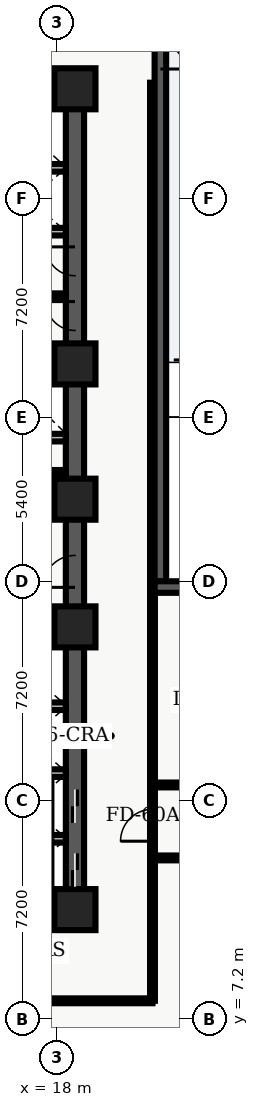
"""IFC4 building model, lengths in metres.
Left out: names, types, materials, properties, quantities, classifications, styles, units other than length and angle.
Written with IfcOpenShell. Run it as: python <this file> out.ifc"""

import sys

from ifc_helpers import new_model, entity, si_unit, converted_unit, direction, frame, origin_with_axes, origin_2d_with_axis, place, context, subcontext, project, spatial, polyline, rectangle, outline, extrude, element, fill, save


model = new_model("IFC4")
c1 = context("Model", 3, precision=1e-05, world=origin_with_axes(), true_north=direction((0.0, 1.0)))
c2 = subcontext(c1, "Body", "Model", "MODEL_VIEW")
j1 = project(units=[si_unit("LENGTHUNIT", "METRE"), converted_unit("PLANEANGLEUNIT", "DEGREE", entity("IfcPlaneAngleMeasure", 0.017), si_unit("PLANEANGLEUNIT", "RADIAN"), dimensions=[0, 0, 0, 0, 0, 0, 0])], contexts=[c1])
p1 = place(None, origin_with_axes())
s1 = spatial("IfcSite", under=j1, at=p1, CompositionType="ELEMENT")
p2 = place(p1, origin_with_axes())
s2 = spatial("IfcBuilding", under=s1, at=p2, CompositionType="ELEMENT")
p3 = place(p2, frame((0.0, 0.0, 28.8), z_axis=(0.0, 0.0, 1.0), x_axis=(1.0, 0.0, 0.0)))
s3 = spatial("IfcBuildingStorey", under=s2, at=p3, CompositionType="ELEMENT", Elevation=28.8)
p4 = place(p3, frame((11.4, 10.8, 0.0), z_axis=(0.0, 0.0, 1.0), x_axis=(1.0, 0.0, 0.0)))
e1 = element("IfcWall", 1, at=p4, inside=s3, PredefinedType="SHEAR", context=c2, shape_type="SweptSolid", body=[
    extrude(outline(polyline([(0.0, -0.3), (7.2, -0.3), (7.2, 0.3), (0.0, 0.3), (0.0, -0.3)])), origin_with_axes(), (0.0, 0.0, 1.0), 3.66),
])
p5 = place(p4, frame((2.625, 0.0, 0.0), z_axis=(0.0, 0.0, 1.0), x_axis=(1.0, 0.0, 0.0)))
e2 = element("IfcOpeningElement", 2, at=p5, cuts=e1, PredefinedType="OPENING", context=c2, shape_type="SweptSolid", body=[
    extrude(rectangle(XDim=1.05, YDim=0.62, at=origin_2d_with_axis()), origin_with_axes(), (0.0, 0.0, 1.0), 2.15),
])
p6 = place(p3, frame((11.4, 37.8, 0.0), z_axis=(0.0, 0.0, 1.0), x_axis=(1.0, 0.0, 0.0)))
e3 = element("IfcWall", 3, at=p6, inside=s3, PredefinedType="SHEAR", context=c2, shape_type="SweptSolid", body=[
    extrude(outline(polyline([(0.0, -0.3), (7.2, -0.3), (7.2, 0.3), (0.0, 0.3), (0.0, -0.3)])), origin_with_axes(), (0.0, 0.0, 1.0), 3.66),
])
p7 = place(p6, frame((2.625, 0.0, 0.0), z_axis=(0.0, 0.0, 1.0), x_axis=(1.0, 0.0, 0.0)))
e4 = element("IfcOpeningElement", 4, at=p7, cuts=e3, PredefinedType="OPENING", context=c2, shape_type="SweptSolid", body=[
    extrude(rectangle(XDim=1.05, YDim=0.62, at=origin_2d_with_axis()), origin_with_axes(), (0.0, 0.0, 1.0), 2.15),
])
p8 = place(p3, frame((18.6, 10.8, 0.0), z_axis=(0.0, 0.0, 1.0), x_axis=(0.0, 1.0, 0.0)))
e5 = element("IfcWall", 5, at=p8, inside=s3, PredefinedType="SHEAR", context=c2, shape_type="SweptSolid", body=[
    extrude(outline(polyline([(0.0, -0.3), (13.5, -0.3), (13.5, 0.3), (0.0, 0.3), (0.0, -0.3)])), origin_with_axes(), (0.0, 0.0, 1.0), 3.66),
])
p9 = place(p8, frame((1.3, 0.0, 0.0), z_axis=(0.0, 0.0, 1.0), x_axis=(1.0, 0.0, 0.0)))
e6 = element("IfcOpeningElement", 6, at=p9, cuts=e5, PredefinedType="OPENING", context=c2, shape_type="SweptSolid", body=[
    extrude(rectangle(XDim=1.1, YDim=0.62, at=origin_2d_with_axis()), origin_with_axes(), (0.0, 0.0, 1.0), 2.15),
])
p10 = place(p8, frame((3.4, 0.0, 0.0), z_axis=(0.0, 0.0, 1.0), x_axis=(1.0, 0.0, 0.0)))
e7 = element("IfcOpeningElement", 7, at=p10, cuts=e5, PredefinedType="OPENING", context=c2, shape_type="SweptSolid", body=[
    extrude(rectangle(XDim=1.1, YDim=0.62, at=origin_2d_with_axis()), origin_with_axes(), (0.0, 0.0, 1.0), 2.15),
])
p11 = place(p8, frame((11.125, 0.0, 0.0), z_axis=(0.0, 0.0, 1.0), x_axis=(1.0, 0.0, 0.0)))
e8 = element("IfcOpeningElement", 8, at=p11, cuts=e5, PredefinedType="OPENING", context=c2, shape_type="SweptSolid", body=[
    extrude(rectangle(XDim=1.05, YDim=0.62, at=origin_2d_with_axis()), origin_with_axes(), (0.0, 0.0, 1.0), 2.15),
])
p12 = place(p3, frame((18.6, 24.3, 0.0), z_axis=(0.0, 0.0, 1.0), x_axis=(0.0, 1.0, 0.0)))
e9 = element("IfcWall", 9, at=p12, inside=s3, PredefinedType="SHEAR", context=c2, shape_type="SweptSolid", body=[
    extrude(outline(polyline([(0.0, -0.3), (13.5, -0.3), (13.5, 0.3), (0.0, 0.3), (0.0, -0.3)])), origin_with_axes(), (0.0, 0.0, 1.0), 3.66),
])
p13 = place(p12, frame((6.025, 0.0, 0.0), z_axis=(0.0, 0.0, 1.0), x_axis=(1.0, 0.0, 0.0)))
e10 = element("IfcOpeningElement", 10, at=p13, cuts=e9, PredefinedType="OPENING", context=c2, shape_type="SweptSolid", body=[
    extrude(rectangle(XDim=0.95, YDim=0.62, at=origin_2d_with_axis()), origin_with_axes(), (0.0, 0.0, 1.0), 2.15),
])
p14 = place(p12, frame((7.825, 0.0, 0.0), z_axis=(0.0, 0.0, 1.0), x_axis=(1.0, 0.0, 0.0)))
e11 = element("IfcOpeningElement", 11, at=p14, cuts=e9, PredefinedType="OPENING", context=c2, shape_type="SweptSolid", body=[
    extrude(rectangle(XDim=0.95, YDim=0.62, at=origin_2d_with_axis()), origin_with_axes(), (0.0, 0.0, 1.0), 2.15),
])
for number, where, z_axis, x_axis in (
    (12, (11.7, 19.825, 0.0), (0.0, 0.0, 1.0), (1.0, 0.0, 0.0)),
    (13, (11.7, 28.775, 0.0), (0.0, 0.0, 1.0), (1.0, 0.0, 0.0)),
):
    element("IfcWall", number, at=place(p3, frame(where, z_axis=z_axis, x_axis=x_axis)), inside=s3, PredefinedType="SHEAR", context=c2, shape_type="SweptSolid", body=[
        extrude(outline(polyline([(0.0, -0.125), (6.6, -0.125), (6.6, 0.125), (0.0, 0.125), (0.0, -0.125)])), origin_with_axes(), (0.0, 0.0, 1.0), 3.66),
    ])
p15 = place(p3, frame((11.7, 24.1, 0.0), z_axis=(0.0, 0.0, 1.0), x_axis=(1.0, 0.0, 0.0)))
e14 = element("IfcWall", 14, at=p15, inside=s3, PredefinedType="SOLIDWALL", context=c2, shape_type="SweptSolid", body=[
    extrude(outline(polyline([(0.0, -0.125), (6.6, -0.125), (6.6, 0.125), (0.0, 0.125), (0.0, -0.125)])), origin_with_axes(), (0.0, 0.0, 1.0), 2.7),
])
p16 = place(p15, frame((3.75, 0.0, 0.0), z_axis=(0.0, 0.0, 1.0), x_axis=(1.0, 0.0, 0.0)))
e15 = element("IfcOpeningElement", 15, at=p16, cuts=e14, PredefinedType="OPENING", context=c2, shape_type="SweptSolid", body=[
    extrude(rectangle(XDim=0.9, YDim=0.27, at=origin_2d_with_axis()), origin_with_axes(), (0.0, 0.0, 1.0), 2.15),
])
p17 = place(p3, frame((11.7, 26.325, 0.0), z_axis=(0.0, 0.0, 1.0), x_axis=(1.0, 0.0, 0.0)))
e16 = element("IfcWall", 16, at=p17, inside=s3, PredefinedType="SOLIDWALL", context=c2, shape_type="SweptSolid", body=[
    extrude(outline(polyline([(0.0, -0.125), (6.6, -0.125), (6.6, 0.125), (0.0, 0.125), (0.0, -0.125)])), origin_with_axes(), (0.0, 0.0, 1.0), 2.7),
])
p18 = place(p17, frame((3.5, 0.0, 0.0), z_axis=(0.0, 0.0, 1.0), x_axis=(1.0, 0.0, 0.0)))
e17 = element("IfcOpeningElement", 17, at=p18, cuts=e16, PredefinedType="OPENING", context=c2, shape_type="SweptSolid", body=[
    extrude(rectangle(XDim=0.9, YDim=0.27, at=origin_2d_with_axis()), origin_with_axes(), (0.0, 0.0, 1.0), 2.15),
])
for number, where, z_axis, x_axis in (
    (18, (18.6, 10.8, 0.0), (0.0, 0.0, 1.0), (1.0, 0.0, 0.0)),
    (19, (18.6, 20.1, 0.0), (0.0, 0.0, 1.0), (1.0, 0.0, 0.0)),
    (20, (18.6, 24.3, 0.0), (0.0, 0.0, 1.0), (1.0, 0.0, 0.0)),
    (21, (18.6, 28.75, 0.0), (0.0, 0.0, 1.0), (1.0, 0.0, 0.0)),
    (22, (18.6, 37.8, 0.0), (0.0, 0.0, 1.0), (1.0, 0.0, 0.0)),
):
    element("IfcColumn", number, at=place(p3, frame(where, z_axis=z_axis, x_axis=x_axis)), inside=s3, PredefinedType="COLUMN", context=c2, shape_type="SweptSolid", body=[
        extrude(rectangle(XDim=1.35, YDim=1.35, at=origin_2d_with_axis()), origin_with_axes(), (0.0, 0.0, 1.0), 3.9),
    ])
p19 = place(p3, frame((14.62, 25.18, 0.0), z_axis=(0.0, 0.0, 1.0), x_axis=(1.0, 0.0, 0.0)))
e23 = element("IfcWall", 23, at=p19, inside=s3, PredefinedType="PARTITIONING", context=c2, shape_type="SweptSolid", body=[
    extrude(outline(polyline([(0.0, -0.08), (3.68, -0.08), (3.68, 0.08), (0.0, 0.08), (0.0, -0.08)])), origin_with_axes(), (0.0, 0.0, 1.0), 2.7),
])
p20 = place(p19, frame((1.95, 0.0, 0.0), z_axis=(0.0, 0.0, 1.0), x_axis=(1.0, 0.0, 0.0)))
e24 = element("IfcOpeningElement", 24, at=p20, cuts=e23, PredefinedType="OPENING", context=c2, shape_type="SweptSolid", body=[
    extrude(rectangle(XDim=0.9, YDim=0.18, at=origin_2d_with_axis()), origin_with_axes(), (0.0, 0.0, 1.0), 2.15),
])
for number, where, z_axis, x_axis in (
    (25, (15.84, 13.13, 0.0), (0.0, 0.0, 1.0), (1.0, 0.0, 0.0)),
    (26, (15.84, 15.29, 0.0), (0.0, 0.0, 1.0), (1.0, 0.0, 0.0)),
    (27, (15.84, 17.49, 0.0), (0.0, 0.0, 1.0), (1.0, 0.0, 0.0)),
    (28, (15.84, 33.1, 0.0), (0.0, 0.0, 1.0), (1.0, 0.0, 0.0)),
    (29, (15.84, 35.2, 0.0), (0.0, 0.0, 1.0), (1.0, 0.0, 0.0)),
):
    element("IfcWall", number, at=place(p3, frame(where, z_axis=z_axis, x_axis=x_axis)), inside=s3, PredefinedType="SOLIDWALL", context=c2, shape_type="SweptSolid", body=[
        extrude(outline(polyline([(0.0, -0.125), (2.46, -0.125), (2.46, 0.125), (0.0, 0.125), (0.0, -0.125)])), origin_with_axes(), (0.0, 0.0, 1.0), 2.7),
    ])
p21 = place(p3, frame((15.84, 31.0, 0.0), z_axis=(0.0, 0.0, 1.0), x_axis=(1.0, 0.0, 0.0)))
e30 = element("IfcWall", 30, at=p21, inside=s3, PredefinedType="PARTITIONING", context=c2, shape_type="SweptSolid", body=[
    extrude(outline(polyline([(0.0, -0.07), (2.46, -0.07), (2.46, 0.07), (0.0, 0.07), (0.0, -0.07)])), origin_with_axes(), (0.0, 0.0, 1.0), 2.7),
])
p22 = place(p3, frame((2.6, 7.8, 0.0), z_axis=(0.0, 0.0, 1.0), x_axis=(1.0, 0.0, 0.0)))
e31 = element("IfcWall", 31, at=p22, inside=s3, PredefinedType="PARTITIONING", context=c2, shape_type="SweptSolid", body=[
    extrude(outline(polyline([(0.0, -0.08), (18.55, -0.08), (18.55, 0.08), (0.0, 0.08), (0.0, -0.08)])), origin_with_axes(), (0.0, 0.0, 1.0), 2.7),
])
p23 = place(p22, frame((3.765, 0.0, 0.0), z_axis=(0.0, 0.0, 1.0), x_axis=(1.0, 0.0, 0.0)))
e32 = element("IfcOpeningElement", 32, at=p23, cuts=e31, PredefinedType="OPENING", context=c2, shape_type="SweptSolid", body=[
    extrude(rectangle(XDim=1.0, YDim=0.18, at=origin_2d_with_axis()), origin_with_axes(), (0.0, 0.0, 1.0), 2.15),
])
p24 = place(p22, frame((13.3, 0.0, 0.0), z_axis=(0.0, 0.0, 1.0), x_axis=(1.0, 0.0, 0.0)))
e33 = element("IfcOpeningElement", 33, at=p24, cuts=e31, PredefinedType="OPENING", context=c2, shape_type="SweptSolid", body=[
    extrude(rectangle(XDim=1.0, YDim=0.18, at=origin_2d_with_axis()), origin_with_axes(), (0.0, 0.0, 1.0), 2.15),
])
p25 = place(p3, frame((21.15, 7.8, 0.0), z_axis=(0.0, 0.0, 1.0), x_axis=(0.0, 1.0, 0.0)))
e34 = element("IfcWall", 34, at=p25, inside=s3, PredefinedType="PARTITIONING", context=c2, shape_type="SweptSolid", body=[
    extrude(outline(polyline([(0.0, -0.08), (30.2, -0.08), (30.2, 0.08), (0.0, 0.08), (0.0, -0.08)])), origin_with_axes(), (0.0, 0.0, 1.0), 2.7),
])
p26 = place(p25, frame((5.775, 0.0, 0.0), z_axis=(0.0, 0.0, 1.0), x_axis=(1.0, 0.0, 0.0)))
e35 = element("IfcOpeningElement", 35, at=p26, cuts=e34, PredefinedType="OPENING", context=c2, shape_type="SweptSolid", body=[
    extrude(rectangle(XDim=1.05, YDim=0.18, at=origin_2d_with_axis()), origin_with_axes(), (0.0, 0.0, 1.0), 2.15),
])
p27 = place(p3, frame((21.15, 12.5, 0.0), z_axis=(0.0, 0.0, 1.0), x_axis=(1.0, 0.0, 0.0)))
e36 = element("IfcWall", 36, at=p27, inside=s3, PredefinedType="PARTITIONING", context=c2, shape_type="SweptSolid", body=[
    extrude(outline(polyline([(0.0, -0.08), (15.2, -0.08), (15.2, 0.08), (0.0, 0.08), (0.0, -0.08)])), origin_with_axes(), (0.0, 0.0, 1.0), 2.7),
])
p28 = place(p27, frame((3.508, 0.0, 0.0), z_axis=(0.0, 0.0, 1.0), x_axis=(1.0, 0.0, 0.0)))
e37 = element("IfcOpeningElement", 37, at=p28, cuts=e36, PredefinedType="OPENING", context=c2, shape_type="SweptSolid", body=[
    extrude(rectangle(XDim=1.0, YDim=0.18, at=origin_2d_with_axis()), origin_with_axes(), (0.0, 0.0, 1.0), 2.15),
])
p29 = place(p27, frame((10.978, 0.0, 0.0), z_axis=(0.0, 0.0, 1.0), x_axis=(1.0, 0.0, 0.0)))
e38 = element("IfcOpeningElement", 38, at=p29, cuts=e36, PredefinedType="OPENING", context=c2, shape_type="SweptSolid", body=[
    extrude(rectangle(XDim=1.2, YDim=0.18, at=origin_2d_with_axis()), origin_with_axes(), (0.0, 0.0, 1.0), 2.2),
])
p30 = place(p3, frame((21.15, 14.9, 0.0), z_axis=(0.0, 0.0, 1.0), x_axis=(1.0, 0.0, 0.0)))
e39 = element("IfcWall", 39, at=p30, inside=s3, PredefinedType="PARTITIONING", context=c2, shape_type="SweptSolid", body=[
    extrude(outline(polyline([(0.0, -0.08), (15.2, -0.08), (15.2, 0.08), (0.0, 0.08), (0.0, -0.08)])), origin_with_axes(), (0.0, 0.0, 1.0), 2.7),
])
p31 = place(p30, frame((3.49, 0.0, 0.0), z_axis=(0.0, 0.0, 1.0), x_axis=(1.0, 0.0, 0.0)))
e40 = element("IfcOpeningElement", 40, at=p31, cuts=e39, PredefinedType="OPENING", context=c2, shape_type="SweptSolid", body=[
    extrude(rectangle(XDim=1.0, YDim=0.18, at=origin_2d_with_axis()), origin_with_axes(), (0.0, 0.0, 1.0), 2.15),
])
p32 = place(p30, frame((10.96, 0.0, 0.0), z_axis=(0.0, 0.0, 1.0), x_axis=(1.0, 0.0, 0.0)))
e41 = element("IfcOpeningElement", 41, at=p32, cuts=e39, PredefinedType="OPENING", context=c2, shape_type="SweptSolid", body=[
    extrude(rectangle(XDim=1.0, YDim=0.18, at=origin_2d_with_axis()), origin_with_axes(), (0.0, 0.0, 1.0), 2.15),
])
p33 = place(p3, frame((21.41, 45.82, 0.0), z_axis=(0.0, 0.0, 1.0), x_axis=(0.0, -1.0, 0.0)))
e42 = element("IfcWall", 42, at=p33, inside=s3, PredefinedType="SOLIDWALL", context=c2, shape_type="SweptSolid", body=[
    extrude(outline(polyline([(0.0, -0.19), (24.22, -0.19), (24.22, 0.19), (0.0, 0.19), (0.0, -0.19)])), origin_with_axes(), (0.0, 0.0, 1.0), 3.66),
])
p34 = place(p33, frame((6.57, 0.0, 0.0), z_axis=(0.0, 0.0, 1.0), x_axis=(1.0, 0.0, 0.0)))
e43 = element("IfcOpeningElement", 43, at=p34, cuts=e42, PredefinedType="OPENING", context=c2, shape_type="SweptSolid", body=[
    extrude(rectangle(XDim=1.6, YDim=0.4, at=origin_2d_with_axis()), origin_with_axes(), (0.0, 0.0, 1.0), 2.2),
])
p35 = place(p33, frame((2.902, 0.0, 0.45), z_axis=(0.0, 0.0, 1.0), x_axis=(1.0, 0.0, 0.0)))
e44 = element("IfcOpeningElement", 44, at=p35, cuts=e42, PredefinedType="OPENING", context=c2, shape_type="SweptSolid", body=[
    extrude(rectangle(XDim=2.1, YDim=0.4, at=origin_2d_with_axis()), origin_with_axes(), (0.0, 0.0, 1.0), 2.2),
])
p36 = place(p3, frame((21.22, 21.41, 0.0), z_axis=(0.0, 0.0, 1.0), x_axis=(1.0, 0.0, 0.0)))
e45 = element("IfcWall", 45, at=p36, inside=s3, PredefinedType="SOLIDWALL", context=c2, shape_type="SweptSolid", body=[
    extrude(outline(polyline([(0.0, -0.19), (17.18, -0.19), (17.18, 0.19), (0.0, 0.19), (0.0, -0.19)])), origin_with_axes(), (0.0, 0.0, 1.0), 3.66),
])
p37 = place(p36, frame((3.263, 0.0, 0.45), z_axis=(0.0, 0.0, 1.0), x_axis=(1.0, 0.0, 0.0)))
e46 = element("IfcOpeningElement", 46, at=p37, cuts=e45, PredefinedType="OPENING", context=c2, shape_type="SweptSolid", body=[
    extrude(rectangle(XDim=2.1, YDim=0.4, at=origin_2d_with_axis()), origin_with_axes(), (0.0, 0.0, 1.0), 2.2),
])
p38 = place(p36, frame((8.59, 0.0, 0.45), z_axis=(0.0, 0.0, 1.0), x_axis=(1.0, 0.0, 0.0)))
e47 = element("IfcOpeningElement", 47, at=p38, cuts=e45, PredefinedType="OPENING", context=c2, shape_type="SweptSolid", body=[
    extrude(rectangle(XDim=2.1, YDim=0.4, at=origin_2d_with_axis()), origin_with_axes(), (0.0, 0.0, 1.0), 2.2),
])
p39 = place(p36, frame((13.467, 0.0, 0.45), z_axis=(0.0, 0.0, 1.0), x_axis=(1.0, 0.0, 0.0)))
e48 = element("IfcOpeningElement", 48, at=p39, cuts=e45, PredefinedType="OPENING", context=c2, shape_type="SweptSolid", body=[
    extrude(rectangle(XDim=2.1, YDim=0.4, at=origin_2d_with_axis()), origin_with_axes(), (0.0, 0.0, 1.0), 2.2),
])
p40 = place(p8, frame((1.3, 0.0, 0.0), z_axis=(0.0, 0.0, 1.0), x_axis=(1.0, 0.0, 0.0)))
e49 = element("IfcDoor", 49, at=p40, inside=s3, OperationType="SLIDING_TO_LEFT", PredefinedType="DOOR", context=c2, shape_type="SweptSolid", body=[
    extrude(rectangle(XDim=1.1, YDim=0.09, at=origin_2d_with_axis()), origin_with_axes(), (0.0, 0.0, 1.0), 2.15),
])
fill(e6, e49)
p41 = place(p8, frame((3.4, 0.0, 0.0), z_axis=(0.0, 0.0, 1.0), x_axis=(1.0, 0.0, 0.0)))
e50 = element("IfcDoor", 50, at=p41, inside=s3, OperationType="SLIDING_TO_RIGHT", PredefinedType="DOOR", context=c2, shape_type="SweptSolid", body=[
    extrude(rectangle(XDim=1.1, YDim=0.09, at=origin_2d_with_axis()), origin_with_axes(), (0.0, 0.0, 1.0), 2.15),
])
fill(e7, e50)
p42 = place(p8, frame((11.125, 0.0, 0.0), z_axis=(0.0, 0.0, 1.0), x_axis=(1.0, 0.0, 0.0)))
e51 = element("IfcDoor", 51, at=p42, inside=s3, OperationType="SINGLE_SWING_LEFT", PredefinedType="DOOR", context=c2, shape_type="SweptSolid", body=[
    extrude(rectangle(XDim=1.05, YDim=0.09, at=origin_2d_with_axis()), origin_with_axes(), (0.0, 0.0, 1.0), 2.15),
])
fill(e8, e51)
p43 = place(p12, frame((6.025, 0.0, 0.0), z_axis=(0.0, 0.0, 1.0), x_axis=(1.0, 0.0, 0.0)))
e52 = element("IfcDoor", 52, at=p43, inside=s3, OperationType="SINGLE_SWING_RIGHT", PredefinedType="DOOR", context=c2, shape_type="SweptSolid", body=[
    extrude(rectangle(XDim=0.95, YDim=0.09, at=origin_2d_with_axis()), origin_with_axes(), (0.0, 0.0, 1.0), 2.15),
])
fill(e10, e52)
p44 = place(p12, frame((7.825, 0.0, 0.0), z_axis=(0.0, 0.0, 1.0), x_axis=(1.0, 0.0, 0.0)))
e53 = element("IfcDoor", 53, at=p44, inside=s3, OperationType="SINGLE_SWING_RIGHT", PredefinedType="DOOR", context=c2, shape_type="SweptSolid", body=[
    extrude(rectangle(XDim=0.95, YDim=0.09, at=origin_2d_with_axis()), origin_with_axes(), (0.0, 0.0, 1.0), 2.15),
])
fill(e11, e53)
p45 = place(p25, frame((5.775, 0.0, 0.0), z_axis=(0.0, 0.0, 1.0), x_axis=(1.0, 0.0, 0.0)))
e54 = element("IfcDoor", 54, at=p45, inside=s3, OperationType="SINGLE_SWING_LEFT", PredefinedType="DOOR", context=c2, shape_type="SweptSolid", body=[
    extrude(rectangle(XDim=1.05, YDim=0.09, at=origin_2d_with_axis()), origin_with_axes(), (0.0, 0.0, 1.0), 2.15),
])
fill(e35, e54)
p46 = place(p33, frame((6.57, 0.0, 0.0), z_axis=(0.0, 0.0, 1.0), x_axis=(1.0, 0.0, 0.0)))
e55 = element("IfcDoor", 55, at=p46, inside=s3, OperationType="DOUBLE_DOOR_SINGLE_SWING", PredefinedType="DOOR", context=c2, shape_type="SweptSolid", body=[
    extrude(rectangle(XDim=1.6, YDim=0.09, at=origin_2d_with_axis()), origin_with_axes(), (0.0, 0.0, 1.0), 2.2),
])
fill(e43, e55)
save(model, sys.argv[1])
